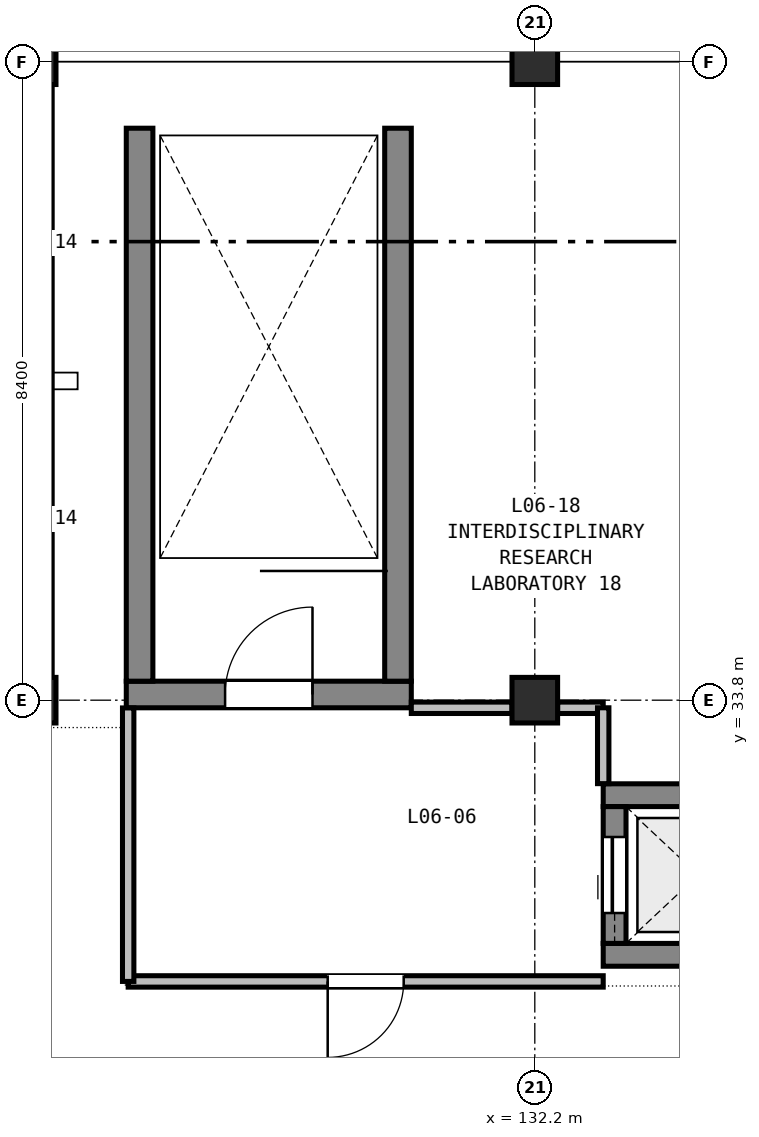
"""IFC4 building model, lengths in metres.
Left out: names, types, materials, properties, quantities, classifications, styles, units other than length and angle.
Written with IfcOpenShell. Run it as: python <this file> out.ifc"""

import sys

from ifc_helpers import new_model, si_unit, direction, frame, frame_2d, origin, origin_2d, place, context, subcontext, project, spatial, rectangle, extrude, element, fill, save


model = new_model("IFC4")
c1 = context("Model", 3, precision=1e-05, world=origin(), true_north=direction((0.0, 1.0)))
c2 = subcontext(c1, "Body", "Model", "MODEL_VIEW")
j1 = project(units=[si_unit("LENGTHUNIT", "METRE"), si_unit("PLANEANGLEUNIT", "RADIAN")], contexts=[c1])
p1 = place(None, origin())
s1 = spatial("IfcSite", under=j1, at=p1, CompositionType="ELEMENT")
p2 = place(p1, origin())
s2 = spatial("IfcBuilding", under=s1, at=p2, CompositionType="ELEMENT")
p3 = place(p2, frame((0.0, 0.0, 28.5)))
s3 = spatial("IfcBuildingStorey", under=s2, at=p3, CompositionType="ELEMENT", Elevation=28.5)
for number, where, z_axis, x_axis in (
    (1, (125.6, 33.8, 0.0), (0.0, 0.0, 1.0), (1.0, 0.0, 0.0)),
    (2, (125.6, 42.2, 0.0), (0.0, 0.0, 1.0), (1.0, 0.0, 0.0)),
    (3, (132.2, 33.8, 0.0), (0.0, 0.0, 1.0), (1.0, 0.0, 0.0)),
    (4, (132.2, 42.2, 0.0), (0.0, 0.0, 1.0), (1.0, 0.0, 0.0)),
):
    element("IfcColumn", number, at=place(p3, frame(where, z_axis=z_axis, x_axis=x_axis)), inside=s3, PredefinedType="COLUMN", context=c2, shape_type="SweptSolid", body=[
        extrude(rectangle(XDim=0.6, YDim=0.6, at=origin_2d()), origin(), (0.0, 0.0, 1.0), 4.14),
    ])
p4 = place(p3, frame((126.825, 33.875, 0.0), z_axis=(0.0, 0.0, 1.0), x_axis=(1.0, 0.0, 0.0)))
e5 = element("IfcWall", 5, at=p4, inside=s3, PredefinedType="SHEAR", context=c2, shape_type="SweptSolid", body=[
    extrude(rectangle(XDim=3.75, YDim=0.35, at=frame_2d((1.875, 0.0))), origin(), (0.0, 0.0, 1.0), 4.14),
])
p5 = place(p4, frame((1.3, 0.0, 0.0)))
e6 = element("IfcOpeningElement", 6, at=p5, cuts=e5, PredefinedType="OPENING", context=c2, shape_type="SweptSolid", body=[
    extrude(rectangle(XDim=1.15, YDim=2.15, at=frame_2d((0.575, 1.075))), frame((0.0, 0.185, 0.0), z_axis=(0.0, -1.0, 0.0), x_axis=(1.0, 0.0, 0.0)), (0.0, 0.0, 1.0), 0.37),
])
p6 = place(p3, frame((126.825, 41.5, 0.0), z_axis=(0.0, 0.0, 1.0), x_axis=(1.0, 0.0, 0.0)))
e7 = element("IfcWall", 7, at=p6, inside=s3, PredefinedType="SHEAR", context=c2, shape_type="SweptSolid", body=[
    extrude(rectangle(XDim=3.75, YDim=0.35, at=frame_2d((1.875, 0.0))), origin(), (0.0, 0.0, 1.0), 4.14),
])
for number, where, z_axis, x_axis in (
    (8, (127.0, 34.05, 0.0), (0.0, 0.0, 1.0), (0.0, 1.0, 0.0)),
    (9, (130.4, 34.05, 0.0), (0.0, 0.0, 1.0), (0.0, 1.0, 0.0)),
):
    element("IfcWall", number, at=place(p3, frame(where, z_axis=z_axis, x_axis=x_axis)), inside=s3, PredefinedType="SHEAR", context=c2, shape_type="SweptSolid", body=[
        extrude(rectangle(XDim=7.275, YDim=0.35, at=frame_2d((3.637, 0.0))), origin(), (0.0, 0.0, 1.0), 4.14),
    ])
for number, where, z_axis, x_axis in (
    (10, (133.1, 30.45, 0.0), (0.0, 0.0, 1.0), (1.0, 0.0, 0.0)),
    (11, (133.1, 32.55, 0.0), (0.0, 0.0, 1.0), (1.0, 0.0, 0.0)),
):
    element("IfcWall", number, at=place(p3, frame(where, z_axis=z_axis, x_axis=x_axis)), inside=s3, PredefinedType="SHEAR", context=c2, shape_type="SweptSolid", body=[
        extrude(rectangle(XDim=2.5, YDim=0.3, at=frame_2d((1.25, 0.0))), origin(), (0.0, 0.0, 1.0), 4.14),
    ])
p7 = place(p3, frame((133.25, 30.6, 0.0), z_axis=(0.0, 0.0, 1.0), x_axis=(0.0, 1.0, 0.0)))
e12 = element("IfcWall", 12, at=p7, inside=s3, PredefinedType="SHEAR", context=c2, shape_type="SweptSolid", body=[
    extrude(rectangle(XDim=1.8, YDim=0.3, at=frame_2d((0.9, 0.0))), origin(), (0.0, 0.0, 1.0), 4.14),
])
p8 = place(p7, frame((0.4, 0.0, 0.0)))
e13 = element("IfcOpeningElement", 13, at=p8, cuts=e12, PredefinedType="OPENING", context=c2, shape_type="SweptSolid", body=[
    extrude(rectangle(XDim=1.0, YDim=2.1, at=frame_2d((0.5, 1.05))), frame((0.0, 0.16, 0.0), z_axis=(0.0, -1.0, 0.0), x_axis=(1.0, 0.0, 0.0)), (0.0, 0.0, 1.0), 0.32),
])
p9 = place(p3, frame((125.6, 42.075, 0.0), z_axis=(0.0, 0.0, 1.0), x_axis=(1.0, 0.0, 0.0)))
e14 = element("IfcWall", 14, at=p9, inside=s3, PredefinedType="STANDARD", context=c2, shape_type="SweptSolid", body=[
    extrude(rectangle(XDim=6.6, YDim=0.25, at=frame_2d((3.3, 0.0))), origin(), (0.0, 0.0, 1.0), 3.435),
])
p10 = place(p9, frame((0.982, 0.0, 0.9)))
e15 = element("IfcOpeningElement", 15, at=p10, cuts=e14, PredefinedType="OPENING", context=c2, shape_type="SweptSolid", body=[
    extrude(rectangle(XDim=1.6, YDim=1.6, at=frame_2d((0.8, 0.8))), frame((0.0, 0.135, 0.0), z_axis=(0.0, -1.0, 0.0), x_axis=(1.0, 0.0, 0.0)), (0.0, 0.0, 1.0), 0.27),
])
p11 = place(p9, frame((4.018, 0.0, 0.9)))
e16 = element("IfcOpeningElement", 16, at=p11, cuts=e14, PredefinedType="OPENING", context=c2, shape_type="SweptSolid", body=[
    extrude(rectangle(XDim=1.6, YDim=1.6, at=frame_2d((0.8, 0.8))), frame((0.0, 0.135, 0.0), z_axis=(0.0, -1.0, 0.0), x_axis=(1.0, 0.0, 0.0)), (0.0, 0.0, 1.0), 0.27),
])
p12 = place(p3, frame((132.2, 42.075, 0.0), z_axis=(0.0, 0.0, 1.0), x_axis=(1.0, 0.0, 0.0)))
e17 = element("IfcWall", 17, at=p12, inside=s3, PredefinedType="STANDARD", context=c2, shape_type="SweptSolid", body=[
    extrude(rectangle(XDim=3.0, YDim=0.25, at=frame_2d((1.5, 0.0))), origin(), (0.0, 0.0, 1.0), 3.435),
])
p13 = place(p3, frame((130.575, 33.7, 0.0), z_axis=(0.0, 0.0, 1.0), x_axis=(1.0, 0.0, 0.0)))
e18 = element("IfcWall", 18, at=p13, inside=s3, PredefinedType="PARTITIONING", context=c2, shape_type="SweptSolid", body=[
    extrude(rectangle(XDim=1.325, YDim=0.15, at=frame_2d((0.663, 0.0))), origin(), (0.0, 0.0, 1.0), 3.585),
])
p14 = place(p3, frame((132.5, 33.7, 0.0), z_axis=(0.0, 0.0, 1.0), x_axis=(1.0, 0.0, 0.0)))
e19 = element("IfcWall", 19, at=p14, inside=s3, PredefinedType="PARTITIONING", context=c2, shape_type="SweptSolid", body=[
    extrude(rectangle(XDim=0.6, YDim=0.15, at=frame_2d((0.3, 0.0))), origin(), (0.0, 0.0, 1.0), 3.585),
])
p15 = place(p3, frame((133.1, 33.7, 0.0), z_axis=(0.0, 0.0, 1.0), x_axis=(0.0, -1.0, 0.0)))
e20 = element("IfcWall", 20, at=p15, inside=s3, PredefinedType="PARTITIONING", context=c2, shape_type="SweptSolid", body=[
    extrude(rectangle(XDim=0.998, YDim=0.15, at=frame_2d((0.499, 0.0))), origin(), (0.0, 0.0, 1.0), 3.585),
])
p16 = place(p3, frame((133.1, 30.1, 0.0), z_axis=(0.0, 0.0, 1.0), x_axis=(-1.0, 0.0, 0.0)))
e21 = element("IfcWall", 21, at=p16, inside=s3, PredefinedType="PARTITIONING", context=c2, shape_type="SweptSolid", body=[
    extrude(rectangle(XDim=6.25, YDim=0.15, at=frame_2d((3.125, 0.0))), origin(), (0.0, 0.0, 1.0), 3.435),
])
p17 = place(p16, frame((2.625, 0.0, 0.0)))
e22 = element("IfcOpeningElement", 22, at=p17, cuts=e21, PredefinedType="OPENING", context=c2, shape_type="SweptSolid", body=[
    extrude(rectangle(XDim=1.0, YDim=2.1, at=frame_2d((0.5, 1.05))), frame((0.0, 0.085, 0.0), z_axis=(0.0, -1.0, 0.0), x_axis=(1.0, 0.0, 0.0)), (0.0, 0.0, 1.0), 0.17),
])
p18 = place(p3, frame((126.85, 30.1, 0.0), z_axis=(0.0, 0.0, 1.0), x_axis=(0.0, 1.0, 0.0)))
e23 = element("IfcWall", 23, at=p18, inside=s3, PredefinedType="PARTITIONING", context=c2, shape_type="SweptSolid", body=[
    extrude(rectangle(XDim=3.598, YDim=0.15, at=frame_2d((1.799, 0.0))), origin(), (0.0, 0.0, 1.0), 3.585),
])
p19 = place(p10, origin())
e24 = element("IfcWindow", 24, at=p19, inside=s3, PartitioningType="SINGLE_PANEL", PredefinedType="WINDOW", context=c2, shape_type="SweptSolid", body=[
    extrude(rectangle(XDim=1.6, YDim=1.6, at=frame_2d((0.8, 0.8))), frame((0.0, 0.03, 0.0), z_axis=(0.0, -1.0, 0.0), x_axis=(1.0, 0.0, 0.0)), (0.0, 0.0, 1.0), 0.06),
])
fill(e15, e24)
p20 = place(p11, origin())
e25 = element("IfcWindow", 25, at=p20, inside=s3, PartitioningType="SINGLE_PANEL", PredefinedType="WINDOW", context=c2, shape_type="SweptSolid", body=[
    extrude(rectangle(XDim=1.6, YDim=1.6, at=frame_2d((0.8, 0.8))), frame((0.0, 0.03, 0.0), z_axis=(0.0, -1.0, 0.0), x_axis=(1.0, 0.0, 0.0)), (0.0, 0.0, 1.0), 0.06),
])
fill(e16, e25)
p21 = place(p5, origin())
e26 = element("IfcDoor", 26, at=p21, inside=s3, OperationType="SINGLE_SWING_RIGHT", PredefinedType="DOOR", context=c2, shape_type="SweptSolid", body=[
    extrude(rectangle(XDim=1.15, YDim=2.15, at=frame_2d((0.575, 1.075))), frame((0.0, 0.025, 0.0), z_axis=(0.0, -1.0, 0.0), x_axis=(1.0, 0.0, 0.0)), (0.0, 0.0, 1.0), 0.05),
])
fill(e6, e26)
p22 = place(p8, origin())
e27 = element("IfcDoor", 27, at=p22, inside=s3, OperationType="SLIDING_TO_LEFT", PredefinedType="DOOR", context=c2, shape_type="SweptSolid", body=[
    extrude(rectangle(XDim=1.0, YDim=2.1, at=frame_2d((0.5, 1.05))), frame((0.0, 0.025, 0.0), z_axis=(0.0, -1.0, 0.0), x_axis=(1.0, 0.0, 0.0)), (0.0, 0.0, 1.0), 0.05),
])
fill(e13, e27)
p23 = place(p17, origin())
e28 = element("IfcDoor", 28, at=p23, inside=s3, OperationType="SINGLE_SWING_RIGHT", PredefinedType="DOOR", context=c2, shape_type="SweptSolid", body=[
    extrude(rectangle(XDim=1.0, YDim=2.1, at=frame_2d((0.5, 1.05))), frame((0.0, 0.025, 0.0), z_axis=(0.0, -1.0, 0.0), x_axis=(1.0, 0.0, 0.0)), (0.0, 0.0, 1.0), 0.05),
])
fill(e22, e28)
save(model, sys.argv[1])
